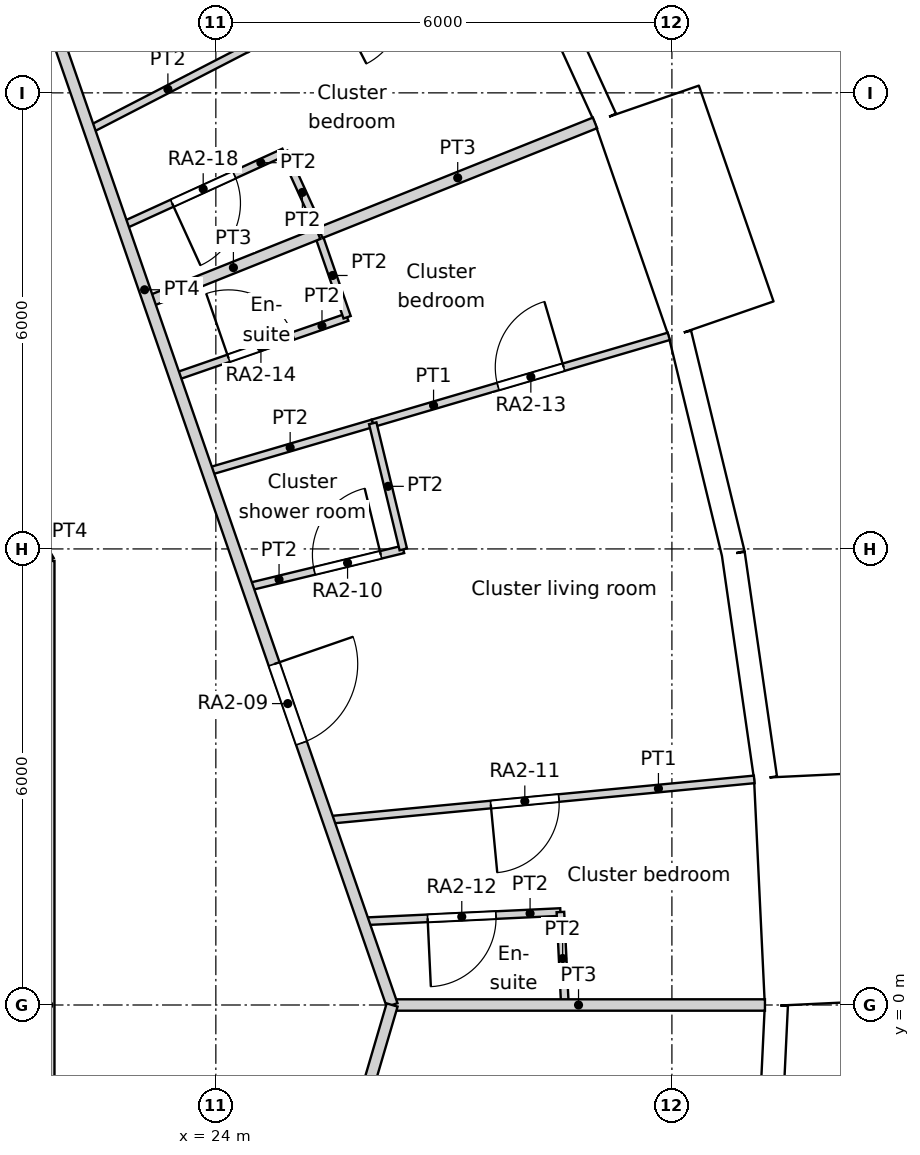
"""IFC4 building model, lengths in metres.
Left out: names, types, materials, properties, quantities, classifications, styles, units other than length and angle.
Written with IfcOpenShell. Run it as: python <this file> out.ifc"""

import sys

from ifc_helpers import new_model, si_unit, direction, frame, frame_2d, origin, origin_2d, place, context, subcontext, project, spatial, rectangle, circle, extrude, element, fill, save


model = new_model("IFC4")
c1 = context("Model", 3, precision=1e-05, world=origin(), true_north=direction((0.0, 1.0)))
c2 = subcontext(c1, "Body", "Model", "MODEL_VIEW")
j1 = project(units=[si_unit("LENGTHUNIT", "METRE"), si_unit("PLANEANGLEUNIT", "RADIAN")], contexts=[c1])
p1 = place(None, origin())
s1 = spatial("IfcSite", under=j1, at=p1, CompositionType="ELEMENT")
p2 = place(p1, origin())
s2 = spatial("IfcBuilding", under=s1, at=p2, CompositionType="ELEMENT")
p3 = place(p2, frame((0.0, 0.0, 39.0)))
s3 = spatial("IfcBuildingStorey", under=s2, at=p3, CompositionType="ELEMENT", Elevation=39.0)
for number, where, z_axis, x_axis in (
    (1, (30.275, 0.0, 0.0), (0.0, 0.0, 1.0), (1.0, 0.0, 0.0)),
    (2, (29.728, 5.729, 0.0), (0.0, 0.0, 1.0), (1.0, 0.0, 0.0)),
    (3, (28.106, 11.252, 0.0), (0.0, 0.0, 1.0), (1.0, 0.0, 0.0)),
):
    element("IfcColumn", number, at=place(p3, frame(where, z_axis=z_axis, x_axis=x_axis)), inside=s3, PredefinedType="COLUMN", context=c2, shape_type="SweptSolid", body=[
        extrude(circle(Radius=0.7, at=origin_2d()), origin(), (0.0, 0.0, 1.0), 3.6),
    ])
for number, where, z_axis, x_axis in (
    (4, (24.548, 0.0, 0.0), (0.0, 0.0, 1.0), (1.0, 0.0, 0.0)),
    (5, (23.886, 5.661, 0.0), (0.0, 0.0, 1.0), (1.0, 0.0, 0.0)),
    (6, (21.937, 11.017, 0.0), (0.0, 0.0, 1.0), (1.0, 0.0, 0.0)),
):
    element("IfcColumn", number, at=place(p3, frame(where, z_axis=z_axis, x_axis=x_axis)), inside=s3, PredefinedType="COLUMN", context=c2, shape_type="SweptSolid", body=[
        extrude(circle(Radius=0.75, at=origin_2d()), origin(), (0.0, 0.0, 1.0), 3.6),
    ])
p4 = place(p3, frame((31.949, 0.02, -0.45), z_axis=(0.0, 0.0, 1.0), x_axis=(-0.047607680889, 0.998866111509, 0.0)))
e7 = element("IfcWall", 7, at=p4, inside=s3, PredefinedType="ELEMENTEDWALL", context=c2, shape_type="SweptSolid", body=[
    extrude(rectangle(XDim=3.0, YDim=1.45, at=frame_2d((1.5, 0.0))), origin(), (0.0, 0.0, 1.0), 3.6),
])
p5 = place(p4, frame((1.5, 0.0, 2.0)))
e8 = element("IfcOpeningElement", 8, at=p5, cuts=e7, PredefinedType="OPENING", context=c2, shape_type="SweptSolid", body=[
    extrude(circle(Radius=0.9, at=origin_2d()), frame((0.0, 0.735, 0.0), z_axis=(0.0, -1.0, 0.0), x_axis=(1.0, 0.0, 0.0)), (0.0, 0.0, 1.0), 1.47),
])
p6 = place(p3, frame((31.231, 2.988, 0.0), z_axis=(0.0, 0.0, 1.0), x_axis=(-0.142315996627, 0.989821275334, 0.0)))
e9 = element("IfcWall", 9, at=p6, inside=s3, PredefinedType="SOLIDWALL", context=c2, shape_type="SweptSolid", body=[
    extrude(rectangle(XDim=2.98, YDim=0.3, at=frame_2d((1.49, 0.0))), origin(), (0.0, 0.0, 1.0), 3.15),
])
p7 = place(p6, frame((1.49, 0.0, 1.55)))
e10 = element("IfcOpeningElement", 10, at=p7, cuts=e9, PredefinedType="OPENING", context=c2, shape_type="SweptSolid", body=[
    extrude(circle(Radius=0.9, at=origin_2d()), frame((0.0, 0.16, 0.0), z_axis=(0.0, -1.0, 0.0), x_axis=(1.0, 0.0, 0.0)), (0.0, 0.0, 1.0), 0.32),
])
p8 = place(p3, frame((30.807, 5.938, 0.0), z_axis=(0.0, 0.0, 1.0), x_axis=(-0.235743081534, 0.971815414319, 0.0)))
e11 = element("IfcWall", 11, at=p8, inside=s3, PredefinedType="SOLIDWALL", context=c2, shape_type="SweptSolid", body=[
    extrude(rectangle(XDim=2.979, YDim=0.3, at=frame_2d((1.49, 0.0))), origin(), (0.0, 0.0, 1.0), 3.15),
])
p9 = place(p8, frame((1.49, 0.0, 1.55)))
e12 = element("IfcOpeningElement", 12, at=p9, cuts=e11, PredefinedType="OPENING", context=c2, shape_type="SweptSolid", body=[
    extrude(circle(Radius=0.9, at=origin_2d()), frame((0.0, 0.16, 0.0), z_axis=(0.0, -1.0, 0.0), x_axis=(1.0, 0.0, 0.0)), (0.0, 0.0, 1.0), 0.32),
])
p10 = place(p3, frame((30.649, 9.021, -0.45), z_axis=(0.0, 0.0, 1.0), x_axis=(-0.327071431777, 0.944999618262, 0.0)))
e13 = element("IfcWall", 13, at=p10, inside=s3, PredefinedType="ELEMENTEDWALL", context=c2, shape_type="SweptSolid", body=[
    extrude(rectangle(XDim=3.0, YDim=1.45, at=frame_2d((1.5, 0.0))), origin(), (0.0, 0.0, 1.0), 3.6),
])
p11 = place(p10, frame((1.5, 0.0, 2.0)))
e14 = element("IfcOpeningElement", 14, at=p11, cuts=e13, PredefinedType="OPENING", context=c2, shape_type="SweptSolid", body=[
    extrude(circle(Radius=0.9, at=origin_2d()), frame((0.0, 0.735, 0.0), z_axis=(0.0, -1.0, 0.0), x_axis=(1.0, 0.0, 0.0)), (0.0, 0.0, 1.0), 1.47),
])
p12 = place(p3, frame((29.125, 11.666, 0.0), z_axis=(0.0, 0.0, 1.0), x_axis=(-0.415407317162, 0.909635509888, 0.0)))
e15 = element("IfcWall", 15, at=p12, inside=s3, PredefinedType="SOLIDWALL", context=c2, shape_type="SweptSolid", body=[
    extrude(rectangle(XDim=2.98, YDim=0.3, at=frame_2d((1.49, 0.0))), origin(), (0.0, 0.0, 1.0), 3.15),
])
p13 = place(p12, frame((1.49, 0.0, 1.55)))
e16 = element("IfcOpeningElement", 16, at=p13, cuts=e15, PredefinedType="OPENING", context=c2, shape_type="SweptSolid", body=[
    extrude(circle(Radius=0.9, at=origin_2d()), frame((0.0, 0.16, 0.0), z_axis=(0.0, -1.0, 0.0), x_axis=(1.0, 0.0, 0.0)), (0.0, 0.0, 1.0), 0.32),
])
p14 = place(p3, frame((31.232, -2.982, 0.0), z_axis=(0.0, 0.0, 1.0), x_axis=(0.047522328113, 0.998870175914, 0.0)))
e17 = element("IfcWall", 17, at=p14, inside=s3, PredefinedType="SOLIDWALL", context=c2, shape_type="SweptSolid", body=[
    extrude(rectangle(XDim=2.98, YDim=0.3, at=frame_2d((1.49, 0.0))), origin(), (0.0, 0.0, 1.0), 3.15),
])
p15 = place(p14, frame((1.49, 0.0, 1.55)))
e18 = element("IfcOpeningElement", 18, at=p15, cuts=e17, PredefinedType="OPENING", context=c2, shape_type="SweptSolid", body=[
    extrude(circle(Radius=0.9, at=origin_2d()), frame((0.0, 0.16, 0.0), z_axis=(0.0, -1.0, 0.0), x_axis=(1.0, 0.0, 0.0)), (0.0, 0.0, 1.0), 0.32),
])
p16 = place(p3, frame((21.802, -5.842, 0.0), z_axis=(0.0, 0.0, 1.0), x_axis=(0.0, 1.0, 0.0)))
e19 = element("IfcWall", 19, at=p16, inside=s3, PredefinedType="PARTITIONING", context=c2, shape_type="SweptSolid", body=[
    extrude(rectangle(XDim=11.684, YDim=0.15, at=frame_2d((5.842, 0.0))), origin(), (0.0, 0.0, 1.0), 3.15),
])
p17 = place(p3, frame((21.364, 6.6, 0.0), z_axis=(0.0, 0.0, 1.0), x_axis=(0.500277597875, -0.865865073245, 0.0)))
e20 = element("IfcWall", 20, at=p17, inside=s3, PredefinedType="PARTITIONING", context=c2, shape_type="SweptSolid", body=[
    extrude(rectangle(XDim=0.875, YDim=0.15, at=frame_2d((0.438, 0.0))), origin(), (0.0, 0.0, 1.0), 3.15),
])
p18 = place(p3, frame((20.689, 16.269, 0.0), z_axis=(0.0, 0.0, 1.0), x_axis=(0.327000485361, -0.945024170365, 0.0)))
e21 = element("IfcWall", 21, at=p18, inside=s3, PredefinedType="PARTITIONING", context=c2, shape_type="SweptSolid", body=[
    extrude(rectangle(XDim=17.216, YDim=0.15, at=frame_2d((8.608, 0.0))), origin(), (0.0, 0.0, 1.0), 3.15),
])
p19 = place(p18, frame((12.47, 0.0, 0.0)))
e22 = element("IfcOpeningElement", 22, at=p19, cuts=e21, PredefinedType="OPENING", context=c2, shape_type="SweptSolid", body=[
    extrude(rectangle(XDim=1.1, YDim=2.1, at=frame_2d((0.55, 1.05))), frame((0.0, 0.075, 0.0), z_axis=(0.0, -1.0, 0.0), x_axis=(1.0, 0.0, 0.0)), (0.0, 0.0, 1.0), 0.15),
])
p20 = place(p18, frame((1.148, 0.0, 0.0)))
e23 = element("IfcOpeningElement", 23, at=p20, cuts=e21, PredefinedType="OPENING", context=c2, shape_type="SweptSolid", body=[
    extrude(rectangle(XDim=1.1, YDim=2.1, at=frame_2d((0.55, 1.05))), frame((0.0, 0.075, 0.0), z_axis=(0.0, -1.0, 0.0), x_axis=(1.0, 0.0, 0.0)), (0.0, 0.0, 1.0), 0.15),
])
p21 = place(p3, frame((22.141, -14.229, 0.0), z_axis=(0.0, 0.0, 1.0), x_axis=(0.281730446162, 0.959493593363, 0.0)))
e24 = element("IfcWall", 24, at=p21, inside=s3, PredefinedType="PARTITIONING", context=c2, shape_type="SweptSolid", body=[
    extrude(rectangle(XDim=14.83, YDim=0.15, at=frame_2d((7.415, 0.0))), origin(), (0.0, 0.0, 1.0), 3.15),
])
p22 = place(p21, frame((6.515, 0.0, 0.0)))
e25 = element("IfcOpeningElement", 25, at=p22, cuts=e24, PredefinedType="OPENING", context=c2, shape_type="SweptSolid", body=[
    extrude(rectangle(XDim=1.0, YDim=2.04, at=frame_2d((0.5, 1.02))), frame((0.0, 0.075, 0.0), z_axis=(0.0, -1.0, 0.0), x_axis=(1.0, 0.0, 0.0)), (0.0, 0.0, 1.0), 0.15),
])
p23 = place(p3, frame((24.416, 5.497, 0.0), z_axis=(0.0, 0.0, 1.0), x_axis=(0.971866967279, 0.23553046069, 0.0)))
e26 = element("IfcWall", 26, at=p23, inside=s3, PredefinedType="PARTITIONING", context=c2, shape_type="SweptSolid", body=[
    extrude(rectangle(XDim=2.109, YDim=0.1, at=frame_2d((1.055, 0.0))), origin(), (0.0, 0.0, 1.0), 3.15),
])
p24 = place(p23, frame((0.905, 0.0, 0.0)))
e27 = element("IfcOpeningElement", 27, at=p24, cuts=e26, PredefinedType="OPENING", context=c2, shape_type="SweptSolid", body=[
    extrude(rectangle(XDim=0.9, YDim=2.0, at=frame_2d((0.45, 1.0))), frame((0.0, 0.05, 0.0), z_axis=(0.0, -1.0, 0.0), x_axis=(1.0, 0.0, 0.0)), (0.0, 0.0, 1.0), 0.1),
])
p25 = place(p3, frame((26.064, 7.653, 0.0), z_axis=(0.0, 0.0, 1.0), x_axis=(0.235530444604, -0.971866971177, 0.0)))
e28 = element("IfcWall", 28, at=p25, inside=s3, PredefinedType="PARTITIONING", context=c2, shape_type="SweptSolid", body=[
    extrude(rectangle(XDim=1.707, YDim=0.1, at=frame_2d((0.854, 0.0))), origin(), (0.0, 0.0, 1.0), 3.15),
])
p26 = place(p3, frame((25.477, 2.433, 0.0), z_axis=(0.0, 0.0, 1.0), x_axis=(0.995478505054, 0.094987083206, 0.0)))
e29 = element("IfcWall", 29, at=p26, inside=s3, PredefinedType="PARTITIONING", context=c2, shape_type="SweptSolid", body=[
    extrude(rectangle(XDim=5.631, YDim=0.1, at=frame_2d((2.816, 0.0))), origin(), (0.0, 0.0, 1.0), 3.15),
])
p27 = place(p26, frame((2.149, 0.0, 0.0)))
e30 = element("IfcOpeningElement", 30, at=p27, cuts=e29, PredefinedType="OPENING", context=c2, shape_type="SweptSolid", body=[
    extrude(rectangle(XDim=0.9, YDim=2.1, at=frame_2d((0.45, 1.05))), frame((0.0, 0.05, 0.0), z_axis=(0.0, -1.0, 0.0), x_axis=(1.0, 0.0, 0.0)), (0.0, 0.0, 1.0), 0.1),
])
p28 = place(p3, frame((26.064, 7.653, 0.0), z_axis=(0.0, 0.0, 1.0), x_axis=(0.959468862097, 0.281814660134, 0.0)))
e31 = element("IfcWall", 31, at=p28, inside=s3, PredefinedType="PARTITIONING", context=c2, shape_type="SweptSolid", body=[
    extrude(rectangle(XDim=4.06, YDim=0.1, at=frame_2d((2.03, 0.0))), origin(), (0.0, 0.0, 1.0), 3.15),
])
p29 = place(p28, frame((1.718, 0.0, 0.0)))
e32 = element("IfcOpeningElement", 32, at=p29, cuts=e31, PredefinedType="OPENING", context=c2, shape_type="SweptSolid", body=[
    extrude(rectangle(XDim=0.9, YDim=2.1, at=frame_2d((0.45, 1.05))), frame((0.0, 0.05, 0.0), z_axis=(0.0, -1.0, 0.0), x_axis=(1.0, 0.0, 0.0)), (0.0, 0.0, 1.0), 0.1),
])
p30 = place(p3, frame((23.891, 7.015, 0.0), z_axis=(0.0, 0.0, 1.0), x_axis=(0.959471865828, 0.281804433402, 0.0)))
e33 = element("IfcWall", 33, at=p30, inside=s3, PredefinedType="PARTITIONING", context=c2, shape_type="SweptSolid", body=[
    extrude(rectangle(XDim=2.265, YDim=0.1, at=frame_2d((1.132, 0.0))), origin(), (0.0, 0.0, 1.0), 3.15),
])
p31 = place(p3, frame((28.533, 1.223, 0.0), z_axis=(0.0, 0.0, 1.0), x_axis=(0.048256750126, -0.99883496438, 0.0)))
e34 = element("IfcWall", 34, at=p31, inside=s3, PredefinedType="PARTITIONING", context=c2, shape_type="SweptSolid", body=[
    extrude(rectangle(XDim=1.224, YDim=0.1, at=frame_2d((0.612, 0.0))), origin(), (0.0, 0.0, 1.0), 3.15),
])
p32 = place(p3, frame((25.938, 1.1, 0.0), z_axis=(0.0, 0.0, 1.0), x_axis=(0.998882127028, 0.047270459111, 0.0)))
e35 = element("IfcWall", 35, at=p32, inside=s3, PredefinedType="PARTITIONING", context=c2, shape_type="SweptSolid", body=[
    extrude(rectangle(XDim=2.598, YDim=0.1, at=frame_2d((1.299, 0.0))), origin(), (0.0, 0.0, 1.0), 3.15),
])
p33 = place(p32, frame((0.849, 0.0, 0.0)))
e36 = element("IfcOpeningElement", 36, at=p33, cuts=e35, PredefinedType="OPENING", context=c2, shape_type="SweptSolid", body=[
    extrude(rectangle(XDim=0.9, YDim=2.04, at=frame_2d((0.45, 1.02))), frame((0.0, 0.05, 0.0), z_axis=(0.0, -1.0, 0.0), x_axis=(1.0, 0.0, 0.0)), (0.0, 0.0, 1.0), 0.1),
])
p34 = place(p3, frame((26.319, 0.0, 0.0), z_axis=(0.0, 0.0, 1.0), x_axis=(1.0, 0.0, 0.0)))
e37 = element("IfcWall", 37, at=p34, inside=s3, PredefinedType="PARTITIONING", context=c2, shape_type="SweptSolid", body=[
    extrude(rectangle(XDim=4.905, YDim=0.15, at=frame_2d((2.453, 0.0))), origin(), (0.0, 0.0, 1.0), 3.15),
])
p35 = place(p3, frame((23.459, 8.263, 0.0), z_axis=(0.0, 0.0, 1.0), x_axis=(0.944978817091, 0.327131525917, 0.0)))
e38 = element("IfcWall", 38, at=p35, inside=s3, PredefinedType="PARTITIONING", context=c2, shape_type="SweptSolid", body=[
    extrude(rectangle(XDim=2.4, YDim=0.1, at=frame_2d((1.2, 0.0))), origin(), (0.0, 0.0, 1.0), 3.15),
])
p36 = place(p35, frame((0.75, 0.0, 0.0)))
e39 = element("IfcOpeningElement", 39, at=p36, cuts=e38, PredefinedType="OPENING", context=c2, shape_type="SweptSolid", body=[
    extrude(rectangle(XDim=0.9, YDim=2.04, at=frame_2d((0.45, 1.02))), frame((0.0, 0.05, 0.0), z_axis=(0.0, -1.0, 0.0), x_axis=(1.0, 0.0, 0.0)), (0.0, 0.0, 1.0), 0.1),
])
p37 = place(p3, frame((25.346, 10.147, 0.0), z_axis=(0.0, 0.0, 1.0), x_axis=(0.327665639351, -0.944793749338, 0.0)))
e40 = element("IfcWall", 40, at=p37, inside=s3, PredefinedType="PARTITIONING", context=c2, shape_type="SweptSolid", body=[
    extrude(rectangle(XDim=1.163, YDim=0.1, at=frame_2d((0.582, 0.0))), origin(), (0.0, 0.0, 1.0), 3.15),
])
p38 = place(p3, frame((25.376, 10.159, 0.0), z_axis=(0.0, 0.0, 1.0), x_axis=(0.928368463908, 0.371661129553, 0.0)))
e41 = element("IfcWall", 41, at=p38, inside=s3, PredefinedType="PARTITIONING", context=c2, shape_type="SweptSolid", body=[
    extrude(rectangle(XDim=3.891, YDim=0.15, at=frame_2d((1.945, 0.0))), origin(), (0.0, 0.0, 1.0), 3.15),
])
p39 = place(p3, frame((23.116, 9.254, 0.0), z_axis=(0.0, 0.0, 1.0), x_axis=(0.928322407966, 0.371776151559, 0.0)))
e42 = element("IfcWall", 42, at=p39, inside=s3, PredefinedType="PARTITIONING", context=c2, shape_type="SweptSolid", body=[
    extrude(rectangle(XDim=2.402, YDim=0.15, at=frame_2d((1.201, 0.0))), origin(), (0.0, 0.0, 1.0), 3.15),
])
p40 = place(p3, frame((22.334, 11.514, 0.0), z_axis=(0.0, 0.0, 1.0), x_axis=(0.888674390259, 0.45853879672, 0.0)))
e43 = element("IfcWall", 43, at=p40, inside=s3, PredefinedType="PARTITIONING", context=c2, shape_type="SweptSolid", body=[
    extrude(rectangle(XDim=2.329, YDim=0.1, at=frame_2d((1.165, 0.0))), origin(), (0.0, 0.0, 1.0), 3.15),
])
p41 = place(p3, frame((24.896, 11.22, 0.0), z_axis=(0.0, 0.0, 1.0), x_axis=(0.415254658207, -0.909705209855, 0.0)))
e44 = element("IfcWall", 44, at=p41, inside=s3, PredefinedType="PARTITIONING", context=c2, shape_type="SweptSolid", body=[
    extrude(rectangle(XDim=1.165, YDim=0.1, at=frame_2d((0.583, 0.0))), origin(), (0.0, 0.0, 1.0), 3.15),
])
p42 = place(p3, frame((22.771, 10.25, 0.0), z_axis=(0.0, 0.0, 1.0), x_axis=(0.909710320081, 0.415243462969, 0.0)))
e45 = element("IfcWall", 45, at=p42, inside=s3, PredefinedType="PARTITIONING", context=c2, shape_type="SweptSolid", body=[
    extrude(rectangle(XDim=2.336, YDim=0.1, at=frame_2d((1.168, 0.0))), origin(), (0.0, 0.0, 1.0), 3.15),
])
p43 = place(p42, frame((0.718, 0.0, 0.0)))
e46 = element("IfcOpeningElement", 46, at=p43, cuts=e45, PredefinedType="OPENING", context=c2, shape_type="SweptSolid", body=[
    extrude(rectangle(XDim=0.9, YDim=2.04, at=frame_2d((0.45, 1.02))), frame((0.0, 0.05, 0.0), z_axis=(0.0, -1.0, 0.0), x_axis=(1.0, 0.0, 0.0)), (0.0, 0.0, 1.0), 0.1),
])
p44 = place(p5, origin())
e47 = element("IfcWindow", 47, at=p44, inside=s3, PartitioningType="SINGLE_PANEL", PredefinedType="WINDOW", context=c2, shape_type="SweptSolid", body=[
    extrude(circle(Radius=0.9, at=origin_2d()), frame((0.0, 0.695, 0.0), z_axis=(0.0, -1.0, 0.0), x_axis=(1.0, 0.0, 0.0)), (0.0, 0.0, 1.0), 0.1),
])
fill(e8, e47)
p45 = place(p7, origin())
e48 = element("IfcWindow", 48, at=p45, inside=s3, PartitioningType="SINGLE_PANEL", PredefinedType="WINDOW", context=c2, shape_type="SweptSolid", body=[
    extrude(circle(Radius=0.9, at=origin_2d()), frame((0.0, 0.12, 0.0), z_axis=(0.0, -1.0, 0.0), x_axis=(1.0, 0.0, 0.0)), (0.0, 0.0, 1.0), 0.1),
])
fill(e10, e48)
p46 = place(p9, origin())
e49 = element("IfcWindow", 49, at=p46, inside=s3, PartitioningType="SINGLE_PANEL", PredefinedType="WINDOW", context=c2, shape_type="SweptSolid", body=[
    extrude(circle(Radius=0.9, at=origin_2d()), frame((0.0, 0.12, 0.0), z_axis=(0.0, -1.0, 0.0), x_axis=(1.0, 0.0, 0.0)), (0.0, 0.0, 1.0), 0.1),
])
fill(e12, e49)
p47 = place(p11, origin())
e50 = element("IfcWindow", 50, at=p47, inside=s3, PartitioningType="SINGLE_PANEL", PredefinedType="WINDOW", context=c2, shape_type="SweptSolid", body=[
    extrude(circle(Radius=0.9, at=origin_2d()), frame((0.0, 0.695, 0.0), z_axis=(0.0, -1.0, 0.0), x_axis=(1.0, 0.0, 0.0)), (0.0, 0.0, 1.0), 0.1),
])
fill(e14, e50)
p48 = place(p13, origin())
e51 = element("IfcWindow", 51, at=p48, inside=s3, PartitioningType="SINGLE_PANEL", PredefinedType="WINDOW", context=c2, shape_type="SweptSolid", body=[
    extrude(circle(Radius=0.9, at=origin_2d()), frame((0.0, 0.12, 0.0), z_axis=(0.0, -1.0, 0.0), x_axis=(1.0, 0.0, 0.0)), (0.0, 0.0, 1.0), 0.1),
])
fill(e16, e51)
p49 = place(p15, origin())
e52 = element("IfcWindow", 52, at=p49, inside=s3, PartitioningType="SINGLE_PANEL", PredefinedType="WINDOW", context=c2, shape_type="SweptSolid", body=[
    extrude(circle(Radius=0.9, at=origin_2d()), frame((0.0, 0.12, 0.0), z_axis=(0.0, -1.0, 0.0), x_axis=(1.0, 0.0, 0.0)), (0.0, 0.0, 1.0), 0.1),
])
fill(e18, e52)
p50 = place(p19, origin())
e53 = element("IfcDoor", 53, at=p50, inside=s3, OperationType="SINGLE_SWING_LEFT", PredefinedType="DOOR", context=c2, shape_type="SweptSolid", body=[
    extrude(rectangle(XDim=1.1, YDim=2.1, at=frame_2d((0.55, 1.05))), frame((0.0, 0.025, 0.0), z_axis=(0.0, -1.0, 0.0), x_axis=(1.0, 0.0, 0.0)), (0.0, 0.0, 1.0), 0.05),
])
fill(e22, e53)
p51 = place(p24, origin())
e54 = element("IfcDoor", 54, at=p51, inside=s3, OperationType="SINGLE_SWING_RIGHT", PredefinedType="DOOR", context=c2, shape_type="SweptSolid", body=[
    extrude(rectangle(XDim=0.9, YDim=2.0, at=frame_2d((0.45, 1.0))), frame((0.0, 0.025, 0.0), z_axis=(0.0, -1.0, 0.0), x_axis=(1.0, 0.0, 0.0)), (0.0, 0.0, 1.0), 0.05),
])
fill(e27, e54)
p52 = place(p27, origin())
e55 = element("IfcDoor", 55, at=p52, inside=s3, OperationType="SINGLE_SWING_RIGHT", PredefinedType="DOOR", context=c2, shape_type="SweptSolid", body=[
    extrude(rectangle(XDim=0.9, YDim=2.1, at=frame_2d((0.45, 1.05))), frame((0.0, 0.025, 0.0), z_axis=(0.0, -1.0, 0.0), x_axis=(1.0, 0.0, 0.0)), (0.0, 0.0, 1.0), 0.05),
])
fill(e30, e55)
p53 = place(p33, origin())
e56 = element("IfcDoor", 56, at=p53, inside=s3, OperationType="SINGLE_SWING_RIGHT", PredefinedType="DOOR", context=c2, shape_type="SweptSolid", body=[
    extrude(rectangle(XDim=0.9, YDim=2.04, at=frame_2d((0.45, 1.02))), frame((0.0, 0.025, 0.0), z_axis=(0.0, -1.0, 0.0), x_axis=(1.0, 0.0, 0.0)), (0.0, 0.0, 1.0), 0.05),
])
fill(e36, e56)
p54 = place(p29, origin())
e57 = element("IfcDoor", 57, at=p54, inside=s3, OperationType="SINGLE_SWING_RIGHT", PredefinedType="DOOR", context=c2, shape_type="SweptSolid", body=[
    extrude(rectangle(XDim=0.9, YDim=2.1, at=frame_2d((0.45, 1.05))), frame((0.0, 0.025, 0.0), z_axis=(0.0, -1.0, 0.0), x_axis=(1.0, 0.0, 0.0)), (0.0, 0.0, 1.0), 0.05),
])
fill(e32, e57)
p55 = place(p36, origin())
e58 = element("IfcDoor", 58, at=p55, inside=s3, OperationType="SINGLE_SWING_LEFT", PredefinedType="DOOR", context=c2, shape_type="SweptSolid", body=[
    extrude(rectangle(XDim=0.9, YDim=2.04, at=frame_2d((0.45, 1.02))), frame((0.0, 0.025, 0.0), z_axis=(0.0, -1.0, 0.0), x_axis=(1.0, 0.0, 0.0)), (0.0, 0.0, 1.0), 0.05),
])
fill(e39, e58)
p56 = place(p43, origin())
e59 = element("IfcDoor", 59, at=p56, inside=s3, OperationType="SINGLE_SWING_RIGHT", PredefinedType="DOOR", context=c2, shape_type="SweptSolid", body=[
    extrude(rectangle(XDim=0.9, YDim=2.04, at=frame_2d((0.45, 1.02))), frame((0.0, 0.025, 0.0), z_axis=(0.0, -1.0, 0.0), x_axis=(1.0, 0.0, 0.0)), (0.0, 0.0, 1.0), 0.05),
])
fill(e46, e59)
save(model, sys.argv[1])
